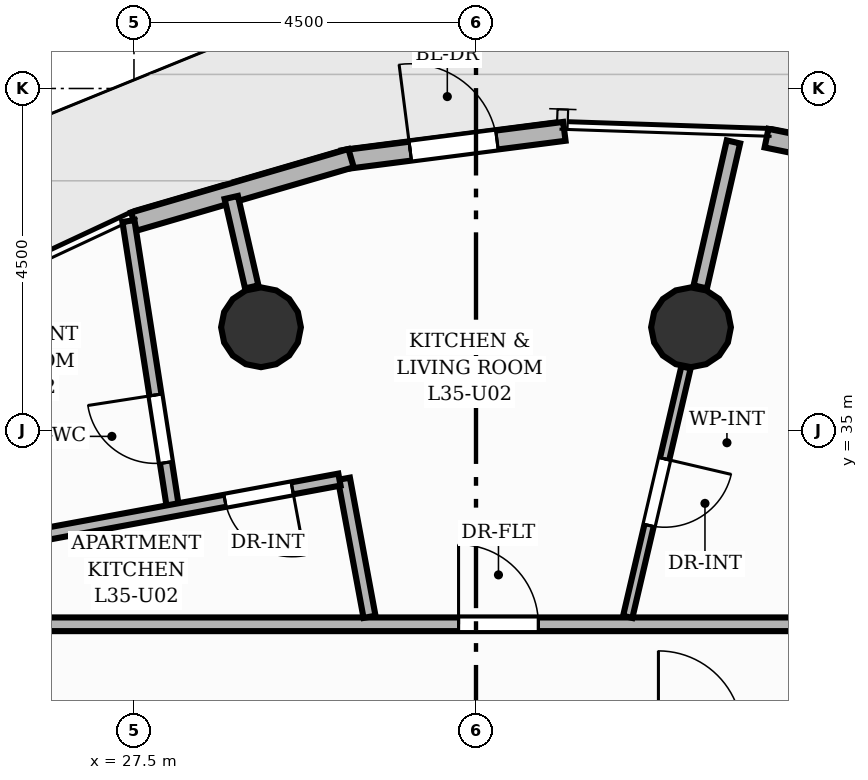
"""IFC4 building model, lengths in metres.
Left out: names, types, materials, properties, quantities, classifications, styles, units other than length and angle.
Written with IfcOpenShell. Run it as: python <this file> out.ifc"""

import sys

from ifc_helpers import new_model, si_unit, direction, frame, frame_2d, origin, origin_2d, place, context, subcontext, project, spatial, rectangle, circle, extrude, element, fill, save


model = new_model("IFC4")
c1 = context("Model", 3, precision=1e-05, world=origin(), true_north=direction((0.0, 1.0)))
c2 = subcontext(c1, "Body", "Model", "MODEL_VIEW")
j1 = project(units=[si_unit("LENGTHUNIT", "METRE"), si_unit("PLANEANGLEUNIT", "RADIAN")], contexts=[c1])
p1 = place(None, origin())
s1 = spatial("IfcSite", under=j1, at=p1, CompositionType="ELEMENT")
p2 = place(p1, origin())
s2 = spatial("IfcBuilding", under=s1, at=p2, CompositionType="ELEMENT")
p3 = place(p2, frame((0.0, 0.0, 120.16)))
s3 = spatial("IfcBuildingStorey", under=s2, at=p3, CompositionType="ELEMENT", Elevation=120.16)
for number, where, z_axis, x_axis in (
    (1, (34.829, 36.358, 0.0), (0.0, 0.0, 1.0), (1.0, 0.0, 0.0)),
    (2, (29.171, 36.358, 0.0), (0.0, 0.0, 1.0), (1.0, 0.0, 0.0)),
):
    element("IfcColumn", number, at=place(p3, frame(where, z_axis=z_axis, x_axis=x_axis)), inside=s3, PredefinedType="COLUMN", context=c2, shape_type="SweptSolid", body=[
        extrude(circle(Radius=0.525, at=origin_2d()), origin(), (0.0, 0.0, 1.0), 3.2),
    ])
p4 = place(p3, frame((35.823, 38.847, 0.0), z_axis=(0.0, 0.0, 1.0), x_axis=(0.97955106245, -0.20119571579, 0.0)))
e3 = element("IfcWall", 3, at=p4, inside=s3, PredefinedType="SOLIDWALL", context=c2, shape_type="SweptSolid", body=[
    extrude(rectangle(XDim=2.818, YDim=0.25, at=frame_2d((1.409, 0.0))), origin(), (0.0, 0.0, 1.0), 2.96),
])
p5 = place(p3, frame((30.25, 38.561, 0.0), z_axis=(0.0, 0.0, 1.0), x_axis=(0.991825107288, 0.1276046886, 0.0)))
e4 = element("IfcWall", 4, at=p5, inside=s3, PredefinedType="SOLIDWALL", context=c2, shape_type="SweptSolid", body=[
    extrude(rectangle(XDim=2.937, YDim=0.25, at=frame_2d((1.468, 0.0))), origin(), (0.0, 0.0, 1.0), 2.96),
])
p6 = place(p5, frame((0.893, 0.0, 0.0)))
e5 = element("IfcOpeningElement", 5, at=p6, cuts=e4, PredefinedType="OPENING", context=c2, shape_type="SweptSolid", body=[
    extrude(rectangle(XDim=1.15, YDim=2.2, at=frame_2d((0.575, 1.1))), frame((0.0, 0.135, 0.0), z_axis=(0.0, -1.0, 0.0), x_axis=(1.0, 0.0, 0.0)), (0.0, 0.0, 1.0), 0.27),
])
p7 = place(p3, frame((27.499, 37.749, 0.0), z_axis=(0.0, 0.0, 1.0), x_axis=(0.95988234126, 0.280403086532, 0.0)))
e6 = element("IfcWall", 6, at=p7, inside=s3, PredefinedType="SOLIDWALL", context=c2, shape_type="SweptSolid", body=[
    extrude(rectangle(XDim=2.977, YDim=0.25, at=frame_2d((1.488, 0.0))), origin(), (0.0, 0.0, 1.0), 2.96),
])
p8 = place(p3, frame((34.95, 36.889, 0.0), z_axis=(0.0, 0.0, 1.0), x_axis=(0.22314653936, 0.97478491062, 0.0)))
e7 = element("IfcWall", 7, at=p8, inside=s3, PredefinedType="PARTITIONING", context=c2, shape_type="SweptSolid", body=[
    extrude(rectangle(XDim=1.957, YDim=0.18, at=frame_2d((0.979, 0.0))), origin(), (0.0, 0.0, 1.0), 2.336),
])
p9 = place(p3, frame((29.05, 36.889, 0.0), z_axis=(0.0, 0.0, 1.0), x_axis=(-0.22307190815, 0.974801992096, 0.0)))
e8 = element("IfcWall", 8, at=p9, inside=s3, PredefinedType="PARTITIONING", context=c2, shape_type="SweptSolid", body=[
    extrude(rectangle(XDim=1.207, YDim=0.18, at=frame_2d((0.604, 0.0))), origin(), (0.0, 0.0, 1.0), 2.336),
])
p10 = place(p3, frame((21.55, 32.45, 0.0), z_axis=(0.0, 0.0, 1.0), x_axis=(1.0, 0.0, 0.0)))
e9 = element("IfcWall", 9, at=p10, inside=s3, PredefinedType="PARTITIONING", context=c2, shape_type="SweptSolid", body=[
    extrude(rectangle(XDim=20.9, YDim=0.18, at=frame_2d((10.45, 0.0))), origin(), (0.0, 0.0, 1.0), 2.955),
])
p11 = place(p10, frame((10.22, 0.0, 0.0)))
e10 = element("IfcOpeningElement", 10, at=p11, cuts=e9, PredefinedType="OPENING", context=c2, shape_type="SweptSolid", body=[
    extrude(rectangle(XDim=1.05, YDim=2.15, at=frame_2d((0.525, 1.075))), frame((0.0, 0.1, 0.0), z_axis=(0.0, -1.0, 0.0), x_axis=(1.0, 0.0, 0.0)), (0.0, 0.0, 1.0), 0.2),
])
p12 = place(p3, frame((28.018, 33.949, 0.0), z_axis=(0.0, 0.0, 1.0), x_axis=(-0.153476019394, 0.988152372598, 0.0)))
e11 = element("IfcWall", 11, at=p12, inside=s3, PredefinedType="PLUMBINGWALL", context=c2, shape_type="SweptSolid", body=[
    extrude(rectangle(XDim=3.853, YDim=0.16, at=frame_2d((1.926, 0.0))), origin(), (0.0, 0.0, 1.0), 2.692),
])
p13 = place(p12, frame((0.636, 0.0, 0.0)))
e12 = element("IfcOpeningElement", 12, at=p13, cuts=e11, PredefinedType="OPENING", context=c2, shape_type="SweptSolid", body=[
    extrude(rectangle(XDim=0.9, YDim=2.1, at=frame_2d((0.45, 1.05))), frame((0.0, 0.09, 0.0), z_axis=(0.0, -1.0, 0.0), x_axis=(1.0, 0.0, 0.0)), (0.0, 0.0, 1.0), 0.18),
])
p14 = place(p3, frame((34.763, 35.83, 0.0), z_axis=(0.0, 0.0, 1.0), x_axis=(-0.227476864998, -0.973783485119, 0.0)))
e13 = element("IfcWall", 13, at=p14, inside=s3, PredefinedType="PARTITIONING", context=c2, shape_type="SweptSolid", body=[
    extrude(rectangle(XDim=3.371, YDim=0.125, at=frame_2d((1.686, 0.0))), origin(), (0.0, 0.0, 1.0), 2.336),
])
p15 = place(p14, frame((1.236, 0.0, 0.0)))
e14 = element("IfcOpeningElement", 14, at=p15, cuts=e13, PredefinedType="OPENING", context=c2, shape_type="SweptSolid", body=[
    extrude(rectangle(XDim=0.9, YDim=2.1, at=frame_2d((0.45, 1.05))), frame((0.0, 0.073, 0.0), z_axis=(0.0, -1.0, 0.0), x_axis=(1.0, 0.0, 0.0)), (0.0, 0.0, 1.0), 0.145),
])
p16 = place(p3, frame((30.599, 32.548, 0.0), z_axis=(0.0, 0.0, 1.0), x_axis=(-0.182221749535, 0.983257460687, 0.0)))
e15 = element("IfcWall", 15, at=p16, inside=s3, PredefinedType="PLUMBINGWALL", context=c2, shape_type="SweptSolid", body=[
    extrude(rectangle(XDim=1.848, YDim=0.16, at=frame_2d((0.924, 0.0))), origin(), (0.0, 0.0, 1.0), 2.955),
])
p17 = place(p3, frame((30.203, 34.354, 0.0), z_axis=(0.0, 0.0, 1.0), x_axis=(-0.983240381988, -0.182313881064, 0.0)))
e16 = element("IfcWall", 16, at=p17, inside=s3, PredefinedType="PLUMBINGWALL", context=c2, shape_type="SweptSolid", body=[
    extrude(rectangle(XDim=5.488, YDim=0.16, at=frame_2d((2.744, 0.0))), origin(), (0.0, 0.0, 1.0), 2.955),
])
p18 = place(p17, frame((0.631, 0.0, 0.0)))
e17 = element("IfcOpeningElement", 17, at=p18, cuts=e16, PredefinedType="OPENING", context=c2, shape_type="SweptSolid", body=[
    extrude(rectangle(XDim=0.9, YDim=2.1, at=frame_2d((0.45, 1.05))), frame((0.0, 0.09, 0.0), z_axis=(0.0, -1.0, 0.0), x_axis=(1.0, 0.0, 0.0)), (0.0, 0.0, 1.0), 0.18),
])
p19 = place(p6, origin())
e18 = element("IfcDoor", 18, at=p19, inside=s3, OperationType="SINGLE_SWING_LEFT", PredefinedType="DOOR", context=c2, shape_type="SweptSolid", body=[
    extrude(rectangle(XDim=1.15, YDim=2.2, at=frame_2d((0.575, 1.1))), frame((0.0, 0.025, 0.0), z_axis=(0.0, -1.0, 0.0), x_axis=(1.0, 0.0, 0.0)), (0.0, 0.0, 1.0), 0.05),
])
fill(e5, e18)
p20 = place(p11, origin())
e19 = element("IfcDoor", 19, at=p20, inside=s3, OperationType="SINGLE_SWING_LEFT", PredefinedType="DOOR", context=c2, shape_type="SweptSolid", body=[
    extrude(rectangle(XDim=1.05, YDim=2.15, at=frame_2d((0.525, 1.075))), frame((0.0, 0.025, 0.0), z_axis=(0.0, -1.0, 0.0), x_axis=(1.0, 0.0, 0.0)), (0.0, 0.0, 1.0), 0.05),
])
fill(e10, e19)
p21 = place(p13, origin())
e20 = element("IfcDoor", 20, at=p21, inside=s3, OperationType="SINGLE_SWING_RIGHT", PredefinedType="DOOR", context=c2, shape_type="SweptSolid", body=[
    extrude(rectangle(XDim=0.9, YDim=2.1, at=frame_2d((0.45, 1.05))), frame((0.0, 0.025, 0.0), z_axis=(0.0, -1.0, 0.0), x_axis=(1.0, 0.0, 0.0)), (0.0, 0.0, 1.0), 0.05),
])
fill(e12, e20)
p22 = place(p15, origin())
e21 = element("IfcDoor", 21, at=p22, inside=s3, OperationType="SINGLE_SWING_LEFT", PredefinedType="DOOR", context=c2, shape_type="SweptSolid", body=[
    extrude(rectangle(XDim=0.9, YDim=2.1, at=frame_2d((0.45, 1.05))), frame((0.0, 0.025, 0.0), z_axis=(0.0, -1.0, 0.0), x_axis=(1.0, 0.0, 0.0)), (0.0, 0.0, 1.0), 0.05),
])
fill(e14, e21)
p23 = place(p18, origin())
e22 = element("IfcDoor", 22, at=p23, inside=s3, OperationType="SINGLE_SWING_LEFT", PredefinedType="DOOR", context=c2, shape_type="SweptSolid", body=[
    extrude(rectangle(XDim=0.9, YDim=2.1, at=frame_2d((0.45, 1.05))), frame((0.0, 0.025, 0.0), z_axis=(0.0, -1.0, 0.0), x_axis=(1.0, 0.0, 0.0)), (0.0, 0.0, 1.0), 0.05),
])
fill(e17, e22)
save(model, sys.argv[1])
